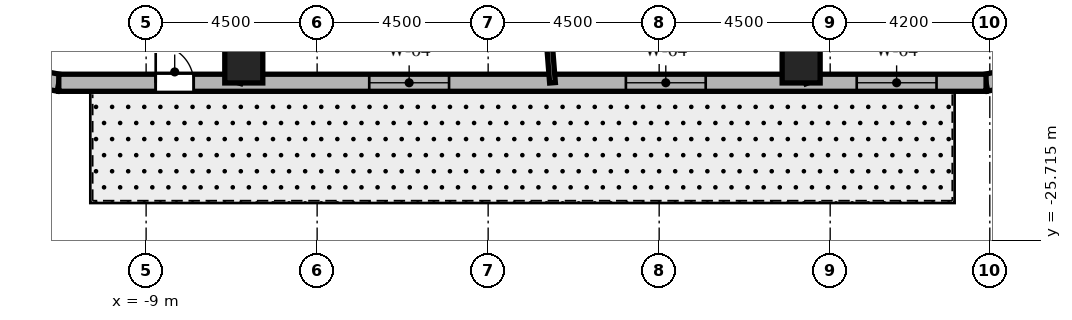
"""IFC4 building model, lengths in metres.
Left out: names, types, materials, properties, quantities, classifications, styles, units other than length and angle.
Written with IfcOpenShell. Run it as: python <this file> out.ifc"""

import sys

from ifc_helpers import new_model, si_unit, direction, frame, frame_2d, origin, origin_2d, place, context, subcontext, project, spatial, rectangle, extrude, element, fill, save


model = new_model("IFC4")
c1 = context("Model", 3, precision=1e-05, world=origin(), true_north=direction((0.0, 1.0)))
c2 = subcontext(c1, "Body", "Model", "MODEL_VIEW")
j1 = project(units=[si_unit("LENGTHUNIT", "METRE"), si_unit("PLANEANGLEUNIT", "RADIAN")], contexts=[c1])
p1 = place(None, origin())
s1 = spatial("IfcSite", under=j1, at=p1, CompositionType="ELEMENT")
p2 = place(p1, origin())
s2 = spatial("IfcBuilding", under=s1, at=p2, CompositionType="ELEMENT")
p3 = place(p2, frame((0.0, 0.0, 244.5)))
s3 = spatial("IfcBuildingStorey", under=s2, at=p3, CompositionType="ELEMENT", Elevation=244.5)
for number, where, z_axis, x_axis in (
    (1, (-6.43, -21.08, 0.0), (0.0, 0.0, 1.0), (1.0, 0.0, 0.0)),
    (2, (8.236, -21.08, 0.0), (0.0, 0.0, 1.0), (1.0, 0.0, 0.0)),
):
    element("IfcColumn", number, at=place(p3, frame(where, z_axis=z_axis, x_axis=x_axis)), inside=s3, PredefinedType="COLUMN", context=c2, shape_type="SweptSolid", body=[
        extrude(rectangle(XDim=1.0, YDim=1.0, at=origin_2d()), origin(), (0.0, 0.0, 1.0), 3.8),
    ])
p4 = place(p3, frame((-12.546, -21.34, 0.0), z_axis=(0.0, 0.0, 1.0), x_axis=(0.982686750835, -0.18527479519, 0.0)))
e3 = element("IfcWall", 3, at=p4, inside=s3, PredefinedType="SOLIDWALL", context=c2, shape_type="SweptSolid", body=[
    extrude(rectangle(XDim=1.27, YDim=0.45, at=frame_2d((0.635, 0.0))), origin(), (0.0, 0.0, 1.0), 3.5),
])
p5 = place(p3, frame((13.102, -21.575, 0.0), z_axis=(0.0, 0.0, 1.0), x_axis=(0.978757421505, 0.205021730188, 0.0)))
e4 = element("IfcWall", 4, at=p5, inside=s3, PredefinedType="SOLIDWALL", context=c2, shape_type="SweptSolid", body=[
    extrude(rectangle(XDim=1.406, YDim=0.45, at=frame_2d((0.703, 0.0))), origin(), (0.0, 0.0, 1.0), 3.5),
])
p6 = place(p3, frame((-11.298, -21.575, 0.0), z_axis=(0.0, 0.0, 1.0), x_axis=(1.0, 0.0, 0.0)))
e5 = element("IfcWall", 5, at=p6, inside=s3, PredefinedType="SOLIDWALL", context=c2, shape_type="SweptSolid", body=[
    extrude(rectangle(XDim=24.399, YDim=0.45, at=frame_2d((12.2, 0.0))), origin(), (0.0, 0.0, 1.0), 3.5),
])
p7 = place(p6, frame((2.55, 0.0, 0.0)))
e6 = element("IfcOpeningElement", 6, at=p7, cuts=e5, PredefinedType="OPENING", context=c2, shape_type="SweptSolid", body=[
    extrude(rectangle(XDim=1.0, YDim=2.15, at=frame_2d((0.5, 1.075))), frame((0.0, 0.235, 0.0), z_axis=(0.0, -1.0, 0.0), x_axis=(1.0, 0.0, 0.0)), (0.0, 0.0, 1.0), 0.47),
])
p8 = place(p6, frame((8.169, 0.0, 0.8)))
e7 = element("IfcOpeningElement", 7, at=p8, cuts=e5, PredefinedType="OPENING", context=c2, shape_type="SweptSolid", body=[
    extrude(rectangle(XDim=2.1, YDim=1.85, at=frame_2d((1.05, 0.925))), frame((0.0, 0.235, 0.0), z_axis=(0.0, -1.0, 0.0), x_axis=(1.0, 0.0, 0.0)), (0.0, 0.0, 1.0), 0.47),
])
p9 = place(p6, frame((14.922, 0.0, 0.8)))
e8 = element("IfcOpeningElement", 8, at=p9, cuts=e5, PredefinedType="OPENING", context=c2, shape_type="SweptSolid", body=[
    extrude(rectangle(XDim=2.1, YDim=1.85, at=frame_2d((1.05, 0.925))), frame((0.0, 0.235, 0.0), z_axis=(0.0, -1.0, 0.0), x_axis=(1.0, 0.0, 0.0)), (0.0, 0.0, 1.0), 0.47),
])
p10 = place(p6, frame((20.996, 0.0, 0.8)))
e9 = element("IfcOpeningElement", 9, at=p10, cuts=e5, PredefinedType="OPENING", context=c2, shape_type="SweptSolid", body=[
    extrude(rectangle(XDim=2.1, YDim=1.85, at=frame_2d((1.05, 0.925))), frame((0.0, 0.235, 0.0), z_axis=(0.0, -1.0, 0.0), x_axis=(1.0, 0.0, 0.0)), (0.0, 0.0, 1.0), 0.47),
])
p11 = place(p3, frame((-3.004, -9.85, 0.0), z_axis=(0.0, 0.0, 1.0), x_axis=(-0.291775760688, -0.956486751333, 0.0)))
e10 = element("IfcWall", 10, at=p11, inside=s3, PredefinedType="PARTITIONING", context=c2, shape_type="SweptSolid", body=[
    extrude(rectangle(XDim=12.258, YDim=0.15, at=frame_2d((6.129, 0.0))), origin(), (0.0, 0.0, 1.0), 2.74),
])
p12 = place(p3, frame((1.1, -14.018, 0.0), z_axis=(0.0, 0.0, 1.0), x_axis=(0.078228275349, -0.996935472804, 0.0)))
e11 = element("IfcWall", 11, at=p12, inside=s3, PredefinedType="PARTITIONING", context=c2, shape_type="SweptSolid", body=[
    extrude(rectangle(XDim=7.581, YDim=0.15, at=frame_2d((3.79, 0.0))), origin(), (0.0, 0.0, 1.0), 2.74),
])
p13 = place(p3, frame((3.848, -9.85, 0.0), z_axis=(0.0, 0.0, 1.0), x_axis=(0.363921778212, -0.931429513889, 0.0)))
e12 = element("IfcWall", 12, at=p13, inside=s3, PredefinedType="PARTITIONING", context=c2, shape_type="SweptSolid", body=[
    extrude(rectangle(XDim=12.588, YDim=0.15, at=frame_2d((6.294, 0.0))), origin(), (0.0, 0.0, 1.0), 2.74),
])
p14 = place(p7, origin())
e13 = element("IfcDoor", 13, at=p14, inside=s3, OperationType="SINGLE_SWING_LEFT", PredefinedType="DOOR", context=c2, shape_type="SweptSolid", body=[
    extrude(rectangle(XDim=1.0, YDim=2.15, at=frame_2d((0.5, 1.075))), frame((0.0, 0.025, 0.0), z_axis=(0.0, -1.0, 0.0), x_axis=(1.0, 0.0, 0.0)), (0.0, 0.0, 1.0), 0.05),
])
fill(e6, e13)
p15 = place(p8, origin())
e14 = element("IfcWindow", 14, at=p15, inside=s3, PartitioningType="SINGLE_PANEL", PredefinedType="WINDOW", context=c2, shape_type="SweptSolid", body=[
    extrude(rectangle(XDim=2.1, YDim=1.85, at=frame_2d((1.05, 0.925))), frame((0.0, 0.03, 0.0), z_axis=(0.0, -1.0, 0.0), x_axis=(1.0, 0.0, 0.0)), (0.0, 0.0, 1.0), 0.06),
])
fill(e7, e14)
p16 = place(p9, origin())
e15 = element("IfcWindow", 15, at=p16, inside=s3, PartitioningType="SINGLE_PANEL", PredefinedType="WINDOW", context=c2, shape_type="SweptSolid", body=[
    extrude(rectangle(XDim=2.1, YDim=1.85, at=frame_2d((1.05, 0.925))), frame((0.0, 0.03, 0.0), z_axis=(0.0, -1.0, 0.0), x_axis=(1.0, 0.0, 0.0)), (0.0, 0.0, 1.0), 0.06),
])
fill(e8, e15)
p17 = place(p10, origin())
e16 = element("IfcWindow", 16, at=p17, inside=s3, PartitioningType="SINGLE_PANEL", PredefinedType="WINDOW", context=c2, shape_type="SweptSolid", body=[
    extrude(rectangle(XDim=2.1, YDim=1.85, at=frame_2d((1.05, 0.925))), frame((0.0, 0.03, 0.0), z_axis=(0.0, -1.0, 0.0), x_axis=(1.0, 0.0, 0.0)), (0.0, 0.0, 1.0), 0.06),
])
fill(e9, e16)
save(model, sys.argv[1])
